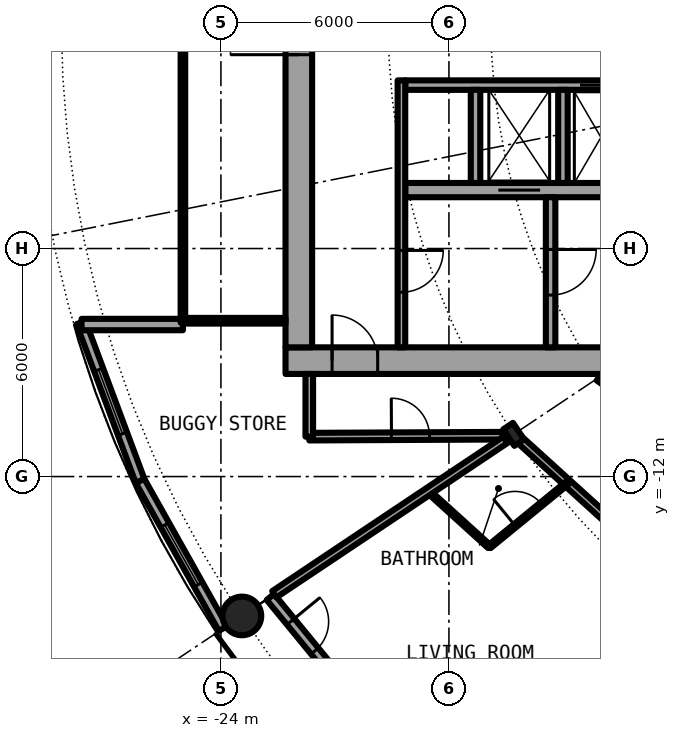
"""IFC4 building model, lengths in metres.
Left out: names, types, materials, properties, quantities, classifications, styles, units other than length and angle.
Written with IfcOpenShell. Run it as: python <this file> out.ifc"""

import sys

from ifc_helpers import new_model, si_unit, direction, frame, frame_2d, origin, origin_2d, place, context, subcontext, project, spatial, rectangle, hollow_circle, i_section, extrude, element, fill, save


model = new_model("IFC4")
c1 = context("Model", 3, precision=1e-05, world=origin(), true_north=direction((0.0, 1.0)))
c2 = subcontext(c1, "Body", "Model", "MODEL_VIEW")
j1 = project(units=[si_unit("LENGTHUNIT", "METRE"), si_unit("PLANEANGLEUNIT", "RADIAN")], contexts=[c1])
p1 = place(None, origin())
s1 = spatial("IfcSite", under=j1, at=p1, CompositionType="ELEMENT")
p2 = place(p1, origin())
s2 = spatial("IfcBuilding", under=s1, at=p2, CompositionType="ELEMENT")
p3 = place(p2, frame((0.0, 0.0, 81.9)))
s3 = spatial("IfcBuildingStorey", under=s2, at=p3, CompositionType="ELEMENT", Elevation=81.9)
p4 = place(p3, frame((-23.448, -15.667, 0.0), z_axis=(0.0, 0.0, 1.0), x_axis=(1.0, 0.0, 0.0)))
e1 = element("IfcColumn", 1, at=p4, inside=s3, PredefinedType="COLUMN", context=c2, shape_type="SweptSolid", body=[
    extrude(hollow_circle(Radius=0.508, WallThickness=0.04, at=origin_2d()), origin(), (0.0, 0.0, 1.0), 3.05),
])
p5 = place(p3, frame((-16.297, -10.889, 0.0), z_axis=(0.0, 0.0, 1.0), x_axis=(-0.831469612303, -0.55557023302, 0.0)))
e2 = element("IfcColumn", 2, at=p5, inside=s3, PredefinedType="COLUMN", context=c2, shape_type="SweptSolid", body=[
    extrude(i_section(OverallWidth=0.306, OverallDepth=0.524, WebThickness=0.021, FlangeThickness=0.04, FilletRadius=0.027, at=origin_2d()), origin(), (0.0, 0.0, 1.0), 3.05),
])
p6 = place(p3, frame((-22.699, -15.167, 0.0), z_axis=(0.0, 0.0, 1.0), x_axis=(0.634382322723, -0.773019449054, 0.0)))
e3 = element("IfcWall", 3, at=p6, inside=s3, PredefinedType="SOLIDWALL", context=c2, shape_type="SweptSolid", body=[
    extrude(rectangle(XDim=5.352, YDim=0.25, at=frame_2d((2.676, 0.0))), origin(), (0.0, 0.0, 1.0), 2.7),
])
p7 = place(p6, frame((0.841, 0.0, 0.0)))
e4 = element("IfcOpeningElement", 4, at=p7, cuts=e3, PredefinedType="OPENING", context=c2, shape_type="SweptSolid", body=[
    extrude(rectangle(XDim=1.0, YDim=2.2, at=frame_2d((0.5, 1.1))), frame((0.0, 0.135, 0.0), z_axis=(0.0, -1.0, 0.0), x_axis=(1.0, 0.0, 0.0)), (0.0, 0.0, 1.0), 0.27),
])
p8 = place(p6, frame((3.111, 0.0, 0.3)))
e5 = element("IfcOpeningElement", 5, at=p8, cuts=e3, PredefinedType="OPENING", context=c2, shape_type="SweptSolid", body=[
    extrude(rectangle(XDim=1.8, YDim=2.1, at=frame_2d((0.9, 1.05))), frame((0.0, 0.135, 0.0), z_axis=(0.0, -1.0, 0.0), x_axis=(1.0, 0.0, 0.0)), (0.0, 0.0, 1.0), 0.27),
])
p9 = place(p3, frame((-27.682, -7.945, 0.0), z_axis=(0.0, 0.0, 1.0), x_axis=(0.349247811493, -0.937030397675, 0.0)))
e6 = element("IfcWall", 6, at=p9, inside=s3, PredefinedType="SOLIDWALL", context=c2, shape_type="SweptSolid", body=[
    extrude(rectangle(XDim=4.452, YDim=0.25, at=frame_2d((2.226, 0.0))), origin(), (0.0, 0.0, 1.0), 2.7),
])
p10 = place(p9, frame((1.327, 0.0, 0.3)))
e7 = element("IfcOpeningElement", 7, at=p10, cuts=e6, PredefinedType="OPENING", context=c2, shape_type="SweptSolid", body=[
    extrude(rectangle(XDim=1.8, YDim=2.1, at=frame_2d((0.9, 1.05))), frame((0.0, 0.135, 0.0), z_axis=(0.0, -1.0, 0.0), x_axis=(1.0, 0.0, 0.0)), (0.0, 0.0, 1.0), 0.27),
])
p11 = place(p3, frame((-26.127, -12.117, 0.0), z_axis=(0.0, 0.0, 1.0), x_axis=(0.489696356642, -0.871893042919, 0.0)))
e8 = element("IfcWall", 8, at=p11, inside=s3, PredefinedType="SOLIDWALL", context=c2, shape_type="SweptSolid", body=[
    extrude(rectangle(XDim=4.454, YDim=0.25, at=frame_2d((2.227, 0.0))), origin(), (0.0, 0.0, 1.0), 2.7),
])
p12 = place(p11, frame((1.327, 0.0, 0.3)))
e9 = element("IfcOpeningElement", 9, at=p12, cuts=e8, PredefinedType="OPENING", context=c2, shape_type="SweptSolid", body=[
    extrude(rectangle(XDim=1.8, YDim=2.1, at=frame_2d((0.9, 1.05))), frame((0.0, 0.135, 0.0), z_axis=(0.0, -1.0, 0.0), x_axis=(1.0, 0.0, 0.0)), (0.0, 0.0, 1.0), 0.27),
])
p13 = place(p3, frame((-25.0, -8.0, 0.0), z_axis=(0.0, 0.0, 1.0), x_axis=(-1.0, 0.0, 0.0)))
e10 = element("IfcWall", 10, at=p13, inside=s3, PredefinedType="SOLIDWALL", context=c2, shape_type="SweptSolid", body=[
    extrude(rectangle(XDim=2.667, YDim=0.3, at=frame_2d((1.333, 0.0))), origin(), (0.0, 0.0, 1.0), 2.7),
])
p14 = place(p3, frame((-22.3, -8.95, 0.0), z_axis=(0.0, 0.0, 1.0), x_axis=(1.0, 0.0, 0.0)))
e11 = element("IfcWall", 11, at=p14, inside=s3, PredefinedType="SHEAR", context=c2, shape_type="SweptSolid", body=[
    extrude(rectangle(XDim=14.0, YDim=0.7, at=frame_2d((7.0, 0.0))), origin(), (0.0, 0.0, 1.0), 3.05),
])
p15 = place(p14, frame((1.225, 0.0, 0.0)))
e12 = element("IfcOpeningElement", 12, at=p15, cuts=e11, PredefinedType="OPENING", context=c2, shape_type="SweptSolid", body=[
    extrude(rectangle(XDim=1.2, YDim=2.3, at=frame_2d((0.6, 1.15))), frame((0.0, 0.36, 0.0), z_axis=(0.0, -1.0, 0.0), x_axis=(1.0, 0.0, 0.0)), (0.0, 0.0, 1.0), 0.72),
])
p16 = place(p3, frame((-21.95, -8.6, 0.0), z_axis=(0.0, 0.0, 1.0), x_axis=(0.0, 1.0, 0.0)))
e13 = element("IfcWall", 13, at=p16, inside=s3, PredefinedType="SHEAR", context=c2, shape_type="SweptSolid", body=[
    extrude(rectangle(XDim=17.2, YDim=0.7, at=frame_2d((8.6, 0.0))), origin(), (0.0, 0.0, 1.0), 3.05),
])
p17 = place(p16, frame((7.7, 0.0, 0.0)))
e14 = element("IfcOpeningElement", 14, at=p17, cuts=e13, PredefinedType="OPENING", context=c2, shape_type="SweptSolid", body=[
    extrude(rectangle(XDim=1.8, YDim=2.3, at=frame_2d((0.9, 1.15))), frame((0.0, 0.36, 0.0), z_axis=(0.0, -1.0, 0.0), x_axis=(1.0, 0.0, 0.0)), (0.0, 0.0, 1.0), 0.72),
])
p18 = place(p3, frame((-9.0, -1.7, 0.0), z_axis=(0.0, 0.0, 1.0), x_axis=(-1.0, 0.0, 0.0)))
e15 = element("IfcWall", 15, at=p18, inside=s3, PredefinedType="SHEAR", context=c2, shape_type="SweptSolid", body=[
    extrude(rectangle(XDim=10.15, YDim=0.25, at=frame_2d((5.075, 0.0))), origin(), (0.0, 0.0, 1.0), 3.05),
])
p19 = place(p18, frame((0.387, 0.0, 0.0)))
e16 = element("IfcOpeningElement", 16, at=p19, cuts=e15, PredefinedType="OPENING", context=c2, shape_type="SweptSolid", body=[
    extrude(rectangle(XDim=1.1, YDim=2.3, at=frame_2d((0.55, 1.15))), frame((0.0, 0.135, 0.0), z_axis=(0.0, -1.0, 0.0), x_axis=(1.0, 0.0, 0.0)), (0.0, 0.0, 1.0), 0.27),
])
p20 = place(p18, frame((2.45, 0.0, 0.0)))
e17 = element("IfcOpeningElement", 17, at=p20, cuts=e15, PredefinedType="OPENING", context=c2, shape_type="SweptSolid", body=[
    extrude(rectangle(XDim=1.1, YDim=2.3, at=frame_2d((0.55, 1.15))), frame((0.0, 0.135, 0.0), z_axis=(0.0, -1.0, 0.0), x_axis=(1.0, 0.0, 0.0)), (0.0, 0.0, 1.0), 0.27),
])
p21 = place(p18, frame((4.45, 0.0, 0.0)))
e18 = element("IfcOpeningElement", 18, at=p21, cuts=e15, PredefinedType="OPENING", context=c2, shape_type="SweptSolid", body=[
    extrude(rectangle(XDim=1.1, YDim=2.3, at=frame_2d((0.55, 1.15))), frame((0.0, 0.135, 0.0), z_axis=(0.0, -1.0, 0.0), x_axis=(1.0, 0.0, 0.0)), (0.0, 0.0, 1.0), 0.27),
])
p22 = place(p3, frame((-9.0, -4.462, 0.0), z_axis=(0.0, 0.0, 1.0), x_axis=(-1.0, 0.0, 0.0)))
e19 = element("IfcWall", 19, at=p22, inside=s3, PredefinedType="SHEAR", context=c2, shape_type="SweptSolid", body=[
    extrude(rectangle(XDim=10.15, YDim=0.375, at=frame_2d((5.075, 0.0))), origin(), (0.0, 0.0, 1.0), 3.05),
])
p23 = place(p22, frame((6.6, 0.0, 0.0)))
e20 = element("IfcOpeningElement", 20, at=p23, cuts=e19, PredefinedType="OPENING", context=c2, shape_type="SweptSolid", body=[
    extrude(rectangle(XDim=1.1, YDim=2.3, at=frame_2d((0.55, 1.15))), frame((0.0, 0.198, 0.0), z_axis=(0.0, -1.0, 0.0), x_axis=(1.0, 0.0, 0.0)), (0.0, 0.0, 1.0), 0.395),
])
p24 = place(p3, frame((-15.325, -4.65, 0.0), z_axis=(0.0, 0.0, 1.0), x_axis=(0.0, -1.0, 0.0)))
e21 = element("IfcWall", 21, at=p24, inside=s3, PredefinedType="SHEAR", context=c2, shape_type="SweptSolid", body=[
    extrude(rectangle(XDim=3.95, YDim=0.25, at=frame_2d((1.975, 0.0))), origin(), (0.0, 0.0, 1.0), 3.05),
])
p25 = place(p24, frame((1.375, 0.0, 0.0)))
e22 = element("IfcOpeningElement", 22, at=p25, cuts=e21, PredefinedType="OPENING", context=c2, shape_type="SweptSolid", body=[
    extrude(rectangle(XDim=1.2, YDim=2.3, at=frame_2d((0.6, 1.15))), frame((0.0, 0.135, 0.0), z_axis=(0.0, -1.0, 0.0), x_axis=(1.0, 0.0, 0.0)), (0.0, 0.0, 1.0), 0.27),
])
for number, where, z_axis, x_axis in (
    (23, (-15.0, -1.825, 0.0), (0.0, 0.0, 1.0), (0.0, -1.0, 0.0)),
    (24, (-17.3, -1.825, 0.0), (0.0, 0.0, 1.0), (0.0, -1.0, 0.0)),
):
    element("IfcWall", number, at=place(p3, frame(where, z_axis=z_axis, x_axis=x_axis)), inside=s3, PredefinedType="SOLIDWALL", context=c2, shape_type="SweptSolid", body=[
        extrude(rectangle(XDim=2.45, YDim=0.25, at=frame_2d((1.225, 0.0))), origin(), (0.0, 0.0, 1.0), 2.7),
    ])
p26 = place(p3, frame((-19.25, -1.575, 0.0), z_axis=(0.0, 0.0, 1.0), x_axis=(0.0, -1.0, 0.0)))
e25 = element("IfcWall", 25, at=p26, inside=s3, PredefinedType="SOLIDWALL", context=c2, shape_type="SweptSolid", body=[
    extrude(rectangle(XDim=7.025, YDim=0.2, at=frame_2d((3.513, 0.0))), origin(), (0.0, 0.0, 1.0), 2.7),
])
p27 = place(p26, frame((4.475, 0.0, 0.0)))
e26 = element("IfcOpeningElement", 26, at=p27, cuts=e25, PredefinedType="OPENING", context=c2, shape_type="SweptSolid", body=[
    extrude(rectangle(XDim=1.1, YDim=2.3, at=frame_2d((0.55, 1.15))), frame((0.0, 0.11, 0.0), z_axis=(0.0, -1.0, 0.0), x_axis=(1.0, 0.0, 0.0)), (0.0, 0.0, 1.0), 0.22),
])
p28 = place(p3, frame((-22.3, -7.9, 0.0), z_axis=(0.0, 0.0, 1.0), x_axis=(-1.0, 0.0, 0.0)))
e27 = element("IfcWall", 27, at=p28, inside=s3, PredefinedType="PARTITIONING", context=c2, shape_type="SweptSolid", body=[
    extrude(rectangle(XDim=2.64, YDim=0.15, at=frame_2d((1.32, 0.0))), origin(), (0.0, 0.0, 1.0), 2.7),
])
p29 = place(p3, frame((-25.0, 7.95, 0.0), z_axis=(0.0, 0.0, 1.0), x_axis=(0.0, -1.0, 0.0)))
e28 = element("IfcWall", 28, at=p29, inside=s3, PredefinedType="PARTITIONING", context=c2, shape_type="SweptSolid", body=[
    extrude(rectangle(XDim=15.9, YDim=0.12, at=frame_2d((7.95, 0.0))), origin(), (0.0, 0.0, 1.0), 2.7),
])
p30 = place(p29, frame((0.95, 0.0, 0.1)))
e29 = element("IfcOpeningElement", 29, at=p30, cuts=e28, PredefinedType="OPENING", context=c2, shape_type="SweptSolid", body=[
    extrude(rectangle(XDim=14.0, YDim=2.35, at=frame_2d((7.0, 1.175))), frame((0.0, 0.07, 0.0), z_axis=(0.0, -1.0, 0.0), x_axis=(1.0, 0.0, 0.0)), (0.0, 0.0, 1.0), 0.14),
])
p31 = place(p3, frame((-18.542, -12.389, 0.0), z_axis=(0.0, 0.0, 1.0), x_axis=(0.740836325503, -0.671685595212, 0.0)))
e30 = element("IfcWall", 30, at=p31, inside=s3, PredefinedType="PARTITIONING", context=c2, shape_type="SweptSolid", body=[
    extrude(rectangle(XDim=2.168, YDim=0.1, at=frame_2d((1.084, 0.0))), origin(), (0.0, 0.0, 1.0), 2.7),
])
p32 = place(p3, frame((-16.179, -10.995, 0.0), z_axis=(0.0, 0.0, 1.0), x_axis=(0.740909940942, -0.671604392044, 0.0)))
e31 = element("IfcWall", 31, at=p32, inside=s3, PredefinedType="PARTITIONING", context=c2, shape_type="SweptSolid", body=[
    extrude(rectangle(XDim=9.367, YDim=0.2, at=frame_2d((4.683, 0.0))), origin(), (0.0, 0.0, 1.0), 2.38),
])
p33 = place(p32, frame((3.152, 0.0, 0.0)))
e32 = element("IfcOpeningElement", 32, at=p33, cuts=e31, PredefinedType="OPENING", context=c2, shape_type="SweptSolid", body=[
    extrude(rectangle(XDim=1.0, YDim=2.3, at=frame_2d((0.5, 1.15))), frame((0.0, 0.11, 0.0), z_axis=(0.0, -1.0, 0.0), x_axis=(1.0, 0.0, 0.0)), (0.0, 0.0, 1.0), 0.22),
])
p34 = place(p3, frame((-14.052, -9.389, 0.0), z_axis=(0.0, 0.0, 1.0), x_axis=(0.803204584823, -0.59570327758, 0.0)))
e33 = element("IfcWall", 33, at=p34, inside=s3, PredefinedType="PARTITIONING", context=c2, shape_type="SweptSolid", body=[
    extrude(rectangle(XDim=11.387, YDim=0.2, at=frame_2d((5.693, 0.0))), origin(), (0.0, 0.0, 1.0), 2.7),
])
p35 = place(p34, frame((6.007, 0.0, 0.0)))
e34 = element("IfcOpeningElement", 34, at=p35, cuts=e33, PredefinedType="OPENING", context=c2, shape_type="SweptSolid", body=[
    extrude(rectangle(XDim=1.0, YDim=2.3, at=frame_2d((0.5, 1.15))), frame((0.0, 0.11, 0.0), z_axis=(0.0, -1.0, 0.0), x_axis=(1.0, 0.0, 0.0)), (0.0, 0.0, 1.0), 0.22),
])
p36 = place(p3, frame((-21.675, -10.95, 0.0), z_axis=(0.0, 0.0, 1.0), x_axis=(0.999988019025, 0.004895079807, 0.0)))
e35 = element("IfcWall", 35, at=p36, inside=s3, PredefinedType="PARTITIONING", context=c2, shape_type="SweptSolid", body=[
    extrude(rectangle(XDim=5.087, YDim=0.2, at=frame_2d((2.543, 0.0))), origin(), (0.0, 0.0, 1.0), 2.7),
])
p37 = place(p36, frame((2.163, 0.0, 0.0)))
e36 = element("IfcOpeningElement", 36, at=p37, cuts=e35, PredefinedType="OPENING", context=c2, shape_type="SweptSolid", body=[
    extrude(rectangle(XDim=1.0, YDim=2.3, at=frame_2d((0.5, 1.15))), frame((0.0, 0.11, 0.0), z_axis=(0.0, -1.0, 0.0), x_axis=(1.0, 0.0, 0.0)), (0.0, 0.0, 1.0), 0.22),
])
p38 = place(p3, frame((-22.595, -15.097, 0.0), z_axis=(0.0, 0.0, 1.0), x_axis=(0.831505405283, 0.555516661303, 0.0)))
e37 = element("IfcWall", 37, at=p38, inside=s3, PredefinedType="PARTITIONING", context=c2, shape_type="SweptSolid", body=[
    extrude(rectangle(XDim=7.312, YDim=0.2, at=frame_2d((3.656, 0.0))), origin(), (0.0, 0.0, 1.0), 2.7),
])
p39 = place(p3, frame((-17.219, -21.023, 0.0), z_axis=(0.0, 0.0, 1.0), x_axis=(0.633664062855, 0.773608334654, 0.0)))
e38 = element("IfcWall", 38, at=p39, inside=s3, PredefinedType="PARTITIONING", context=c2, shape_type="SweptSolid", body=[
    extrude(rectangle(XDim=8.138, YDim=0.1, at=frame_2d((4.069, 0.0))), origin(), (0.0, 0.0, 1.0), 2.7),
])
p40 = place(p39, frame((6.377, 0.0, 0.0)))
e39 = element("IfcOpeningElement", 39, at=p40, cuts=e38, PredefinedType="OPENING", context=c2, shape_type="SweptSolid", body=[
    extrude(rectangle(XDim=0.9, YDim=2.3, at=frame_2d((0.45, 1.15))), frame((0.0, 0.06, 0.0), z_axis=(0.0, -1.0, 0.0), x_axis=(1.0, 0.0, 0.0)), (0.0, 0.0, 1.0), 0.12),
])
p41 = place(p39, frame((2.308, 0.0, 0.0)))
e40 = element("IfcOpeningElement", 40, at=p41, cuts=e38, PredefinedType="OPENING", context=c2, shape_type="SweptSolid", body=[
    extrude(rectangle(XDim=0.9, YDim=2.3, at=frame_2d((0.45, 1.15))), frame((0.0, 0.06, 0.0), z_axis=(0.0, -1.0, 0.0), x_axis=(1.0, 0.0, 0.0)), (0.0, 0.0, 1.0), 0.12),
])
p42 = place(p3, frame((-16.936, -13.845, 0.0), z_axis=(0.0, 0.0, 1.0), x_axis=(0.774162545943, 0.632986850147, 0.0)))
e41 = element("IfcWall", 41, at=p42, inside=s3, PredefinedType="PARTITIONING", context=c2, shape_type="SweptSolid", body=[
    extrude(rectangle(XDim=2.649, YDim=0.1, at=frame_2d((1.325, 0.0))), origin(), (0.0, 0.0, 1.0), 2.7),
])
p43 = place(p42, frame((0.875, 0.0, 0.0)))
e42 = element("IfcOpeningElement", 42, at=p43, cuts=e41, PredefinedType="OPENING", context=c2, shape_type="SweptSolid", body=[
    extrude(rectangle(XDim=0.9, YDim=2.3, at=frame_2d((0.45, 1.15))), frame((0.0, 0.06, 0.0), z_axis=(0.0, -1.0, 0.0), x_axis=(1.0, 0.0, 0.0)), (0.0, 0.0, 1.0), 0.12),
])
p44 = place(p3, frame((-21.675, -10.95, 0.0), z_axis=(0.0, 0.0, 1.0), x_axis=(0.0, 1.0, 0.0)))
e43 = element("IfcWall", 43, at=p44, inside=s3, PredefinedType="PARTITIONING", context=c2, shape_type="SweptSolid", body=[
    extrude(rectangle(XDim=1.65, YDim=0.2, at=frame_2d((0.825, 0.0))), origin(), (0.0, 0.0, 1.0), 2.7),
])
p45 = place(p7, origin())
e44 = element("IfcDoor", 44, at=p45, inside=s3, OperationType="SINGLE_SWING_LEFT", PredefinedType="DOOR", context=c2, shape_type="SweptSolid", body=[
    extrude(rectangle(XDim=1.0, YDim=2.2, at=frame_2d((0.5, 1.1))), frame((0.0, 0.025, 0.0), z_axis=(0.0, -1.0, 0.0), x_axis=(1.0, 0.0, 0.0)), (0.0, 0.0, 1.0), 0.05),
])
fill(e4, e44)
p46 = place(p10, origin())
e45 = element("IfcWindow", 45, at=p46, inside=s3, PartitioningType="SINGLE_PANEL", PredefinedType="WINDOW", context=c2, shape_type="SweptSolid", body=[
    extrude(rectangle(XDim=1.8, YDim=2.1, at=frame_2d((0.9, 1.05))), frame((0.0, 0.03, 0.0), z_axis=(0.0, -1.0, 0.0), x_axis=(1.0, 0.0, 0.0)), (0.0, 0.0, 1.0), 0.06),
])
fill(e7, e45)
p47 = place(p12, origin())
e46 = element("IfcWindow", 46, at=p47, inside=s3, PartitioningType="SINGLE_PANEL", PredefinedType="WINDOW", context=c2, shape_type="SweptSolid", body=[
    extrude(rectangle(XDim=1.8, YDim=2.1, at=frame_2d((0.9, 1.05))), frame((0.0, 0.03, 0.0), z_axis=(0.0, -1.0, 0.0), x_axis=(1.0, 0.0, 0.0)), (0.0, 0.0, 1.0), 0.06),
])
fill(e9, e46)
p48 = place(p21, origin())
e47 = element("IfcDoor", 47, at=p48, inside=s3, OperationType="DOUBLE_DOOR_SLIDING", PredefinedType="DOOR", context=c2, shape_type="SweptSolid", body=[
    extrude(rectangle(XDim=1.1, YDim=2.3, at=frame_2d((0.55, 1.15))), frame((0.0, 0.025, 0.0), z_axis=(0.0, -1.0, 0.0), x_axis=(1.0, 0.0, 0.0)), (0.0, 0.0, 1.0), 0.05),
])
fill(e18, e47)
p49 = place(p23, origin())
e48 = element("IfcDoor", 48, at=p49, inside=s3, OperationType="DOUBLE_DOOR_SLIDING", PredefinedType="DOOR", context=c2, shape_type="SweptSolid", body=[
    extrude(rectangle(XDim=1.1, YDim=2.3, at=frame_2d((0.55, 1.15))), frame((0.0, 0.025, 0.0), z_axis=(0.0, -1.0, 0.0), x_axis=(1.0, 0.0, 0.0)), (0.0, 0.0, 1.0), 0.05),
])
fill(e20, e48)
p50 = place(p25, origin())
e49 = element("IfcDoor", 49, at=p50, inside=s3, OperationType="SINGLE_SWING_LEFT", PredefinedType="DOOR", context=c2, shape_type="SweptSolid", body=[
    extrude(rectangle(XDim=1.2, YDim=2.3, at=frame_2d((0.6, 1.15))), frame((0.0, 0.025, 0.0), z_axis=(0.0, -1.0, 0.0), x_axis=(1.0, 0.0, 0.0)), (0.0, 0.0, 1.0), 0.05),
])
fill(e22, e49)
p51 = place(p27, origin())
e50 = element("IfcDoor", 50, at=p51, inside=s3, OperationType="SINGLE_SWING_LEFT", PredefinedType="DOOR", context=c2, shape_type="SweptSolid", body=[
    extrude(rectangle(XDim=1.1, YDim=2.3, at=frame_2d((0.55, 1.15))), frame((0.0, 0.025, 0.0), z_axis=(0.0, -1.0, 0.0), x_axis=(1.0, 0.0, 0.0)), (0.0, 0.0, 1.0), 0.05),
])
fill(e26, e50)
p52 = place(p15, origin())
e51 = element("IfcDoor", 51, at=p52, inside=s3, OperationType="SINGLE_SWING_RIGHT", PredefinedType="DOOR", context=c2, shape_type="SweptSolid", body=[
    extrude(rectangle(XDim=1.2, YDim=2.3, at=frame_2d((0.6, 1.15))), frame((0.0, 0.025, 0.0), z_axis=(0.0, -1.0, 0.0), x_axis=(1.0, 0.0, 0.0)), (0.0, 0.0, 1.0), 0.05),
])
fill(e12, e51)
p53 = place(p17, origin())
e52 = element("IfcDoor", 52, at=p53, inside=s3, OperationType="SINGLE_SWING_LEFT", PredefinedType="DOOR", context=c2, shape_type="SweptSolid", body=[
    extrude(rectangle(XDim=1.8, YDim=2.3, at=frame_2d((0.9, 1.15))), frame((0.0, 0.025, 0.0), z_axis=(0.0, -1.0, 0.0), x_axis=(1.0, 0.0, 0.0)), (0.0, 0.0, 1.0), 0.05),
])
fill(e14, e52)
p54 = place(p30, origin())
e53 = element("IfcWindow", 53, at=p54, inside=s3, PartitioningType="SINGLE_PANEL", PredefinedType="WINDOW", context=c2, shape_type="SweptSolid", body=[
    extrude(rectangle(XDim=14.0, YDim=2.35, at=frame_2d((7.0, 1.175))), frame((0.0, 0.03, 0.0), z_axis=(0.0, -1.0, 0.0), x_axis=(1.0, 0.0, 0.0)), (0.0, 0.0, 1.0), 0.06),
])
fill(e29, e53)
p55 = place(p43, origin())
e54 = element("IfcDoor", 54, at=p55, inside=s3, OperationType="SINGLE_SWING_LEFT", PredefinedType="DOOR", context=c2, shape_type="SweptSolid", body=[
    extrude(rectangle(XDim=0.9, YDim=2.3, at=frame_2d((0.45, 1.15))), frame((0.0, 0.025, 0.0), z_axis=(0.0, -1.0, 0.0), x_axis=(1.0, 0.0, 0.0)), (0.0, 0.0, 1.0), 0.05),
])
fill(e42, e54)
p56 = place(p37, origin())
e55 = element("IfcDoor", 55, at=p56, inside=s3, OperationType="SINGLE_SWING_RIGHT", PredefinedType="DOOR", context=c2, shape_type="SweptSolid", body=[
    extrude(rectangle(XDim=1.0, YDim=2.3, at=frame_2d((0.5, 1.15))), frame((0.0, 0.025, 0.0), z_axis=(0.0, -1.0, 0.0), x_axis=(1.0, 0.0, 0.0)), (0.0, 0.0, 1.0), 0.05),
])
fill(e36, e55)
save(model, sys.argv[1])
